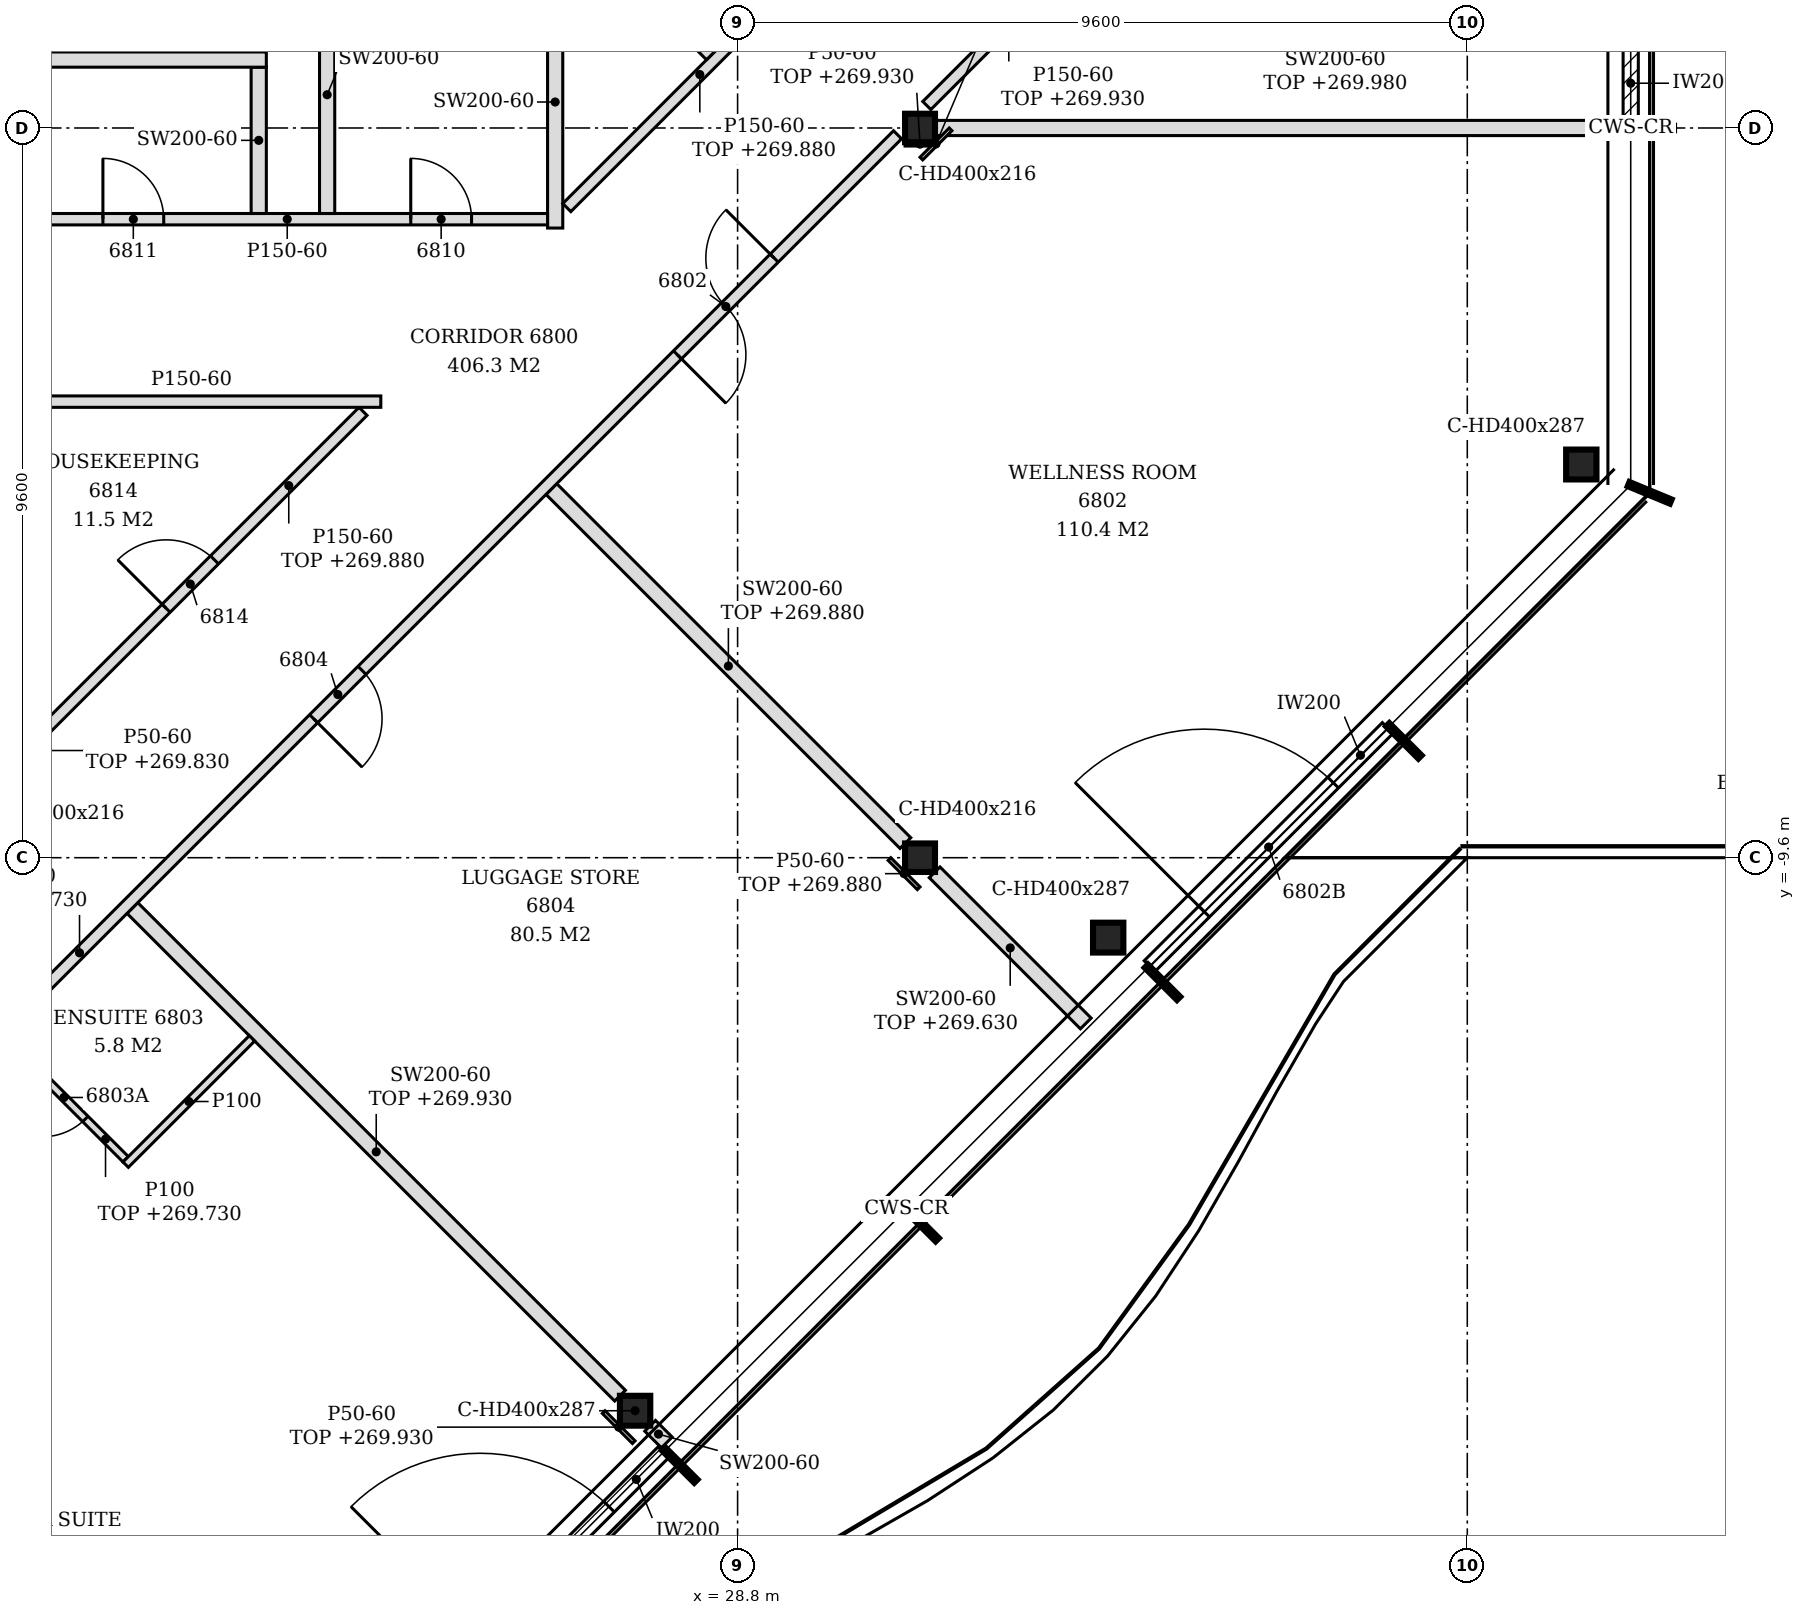
"""IFC4 building model, lengths in metres.
Left out: names, types, materials, properties, quantities, classifications, styles, units other than length and angle.
Written with IfcOpenShell. Run it as: python <this file> out.ifc"""

import sys

from ifc_helpers import new_model, si_unit, direction, frame, frame_2d, origin, origin_2d, place, context, subcontext, project, spatial, polyline, rectangle, i_section, outline, extrude, element, fill, save


model = new_model("IFC4")
c1 = context("Model", 3, precision=1e-05, world=origin(), true_north=direction((0.0, 1.0)))
c2 = subcontext(c1, "Body", "Model", "MODEL_VIEW")
j1 = project(units=[si_unit("LENGTHUNIT", "METRE"), si_unit("PLANEANGLEUNIT", "RADIAN")], contexts=[c1])
p1 = place(None, origin())
s1 = spatial("IfcSite", under=j1, at=p1, CompositionType="ELEMENT")
p2 = place(p1, origin())
s2 = spatial("IfcBuilding", under=s1, at=p2, CompositionType="ELEMENT")
p3 = place(p2, frame((0.0, 0.0, 267.0)))
s3 = spatial("IfcBuildingStorey", under=s2, at=p3, CompositionType="ELEMENT", Elevation=267.0)
for number, where, z_axis, x_axis in (
    (1, (27.451, -16.876, -0.15), (0.0, 0.0, 1.0), (1.0, 0.0, 0.0)),
    (2, (33.676, -10.652, -0.15), (0.0, 0.0, 1.0), (1.0, 0.0, 0.0)),
    (3, (39.9, -4.427, -0.15), (0.0, 0.0, 1.0), (1.0, 0.0, 0.0)),
):
    element("IfcColumn", number, at=place(p3, frame(where, z_axis=z_axis, x_axis=x_axis)), inside=s3, PredefinedType="COLUMN", context=c2, shape_type="SweptSolid", body=[
        extrude(i_section(OverallWidth=0.399, OverallDepth=0.393, WebThickness=0.023, FlangeThickness=0.037, FilletRadius=0.015, at=origin_2d()), origin(), (0.0, 0.0, 1.0), 3.6),
    ])
for number, where, z_axis, x_axis in (
    (4, (31.2, -9.6, -0.15), (0.0, 0.0, 1.0), (1.0, 0.0, 0.0)),
    (5, (31.2, 0.0, -0.15), (0.0, 0.0, 1.0), (1.0, 0.0, 0.0)),
):
    element("IfcColumn", number, at=place(p3, frame(where, z_axis=z_axis, x_axis=x_axis)), inside=s3, PredefinedType="COLUMN", context=c2, shape_type="SweptSolid", body=[
        extrude(i_section(OverallWidth=0.394, OverallDepth=0.375, WebThickness=0.017, FlangeThickness=0.028, FilletRadius=0.015, at=origin_2d()), origin(), (0.0, 0.0, 1.0), 3.6),
    ])
p4 = place(p3, frame((24.693, -20.553, 0.0), z_axis=(0.0, 0.0, 1.0), x_axis=(0.707079231393, 0.707134329907, 0.0)))
e6 = element("IfcWall", 6, at=p4, inside=s3, PredefinedType="NOTDEFINED", context=c2, shape_type="SweptSolid", body=[
    extrude(rectangle(XDim=4.431, YDim=0.2, at=frame_2d((2.215, 0.0))), origin(), (0.0, 0.0, 1.0), 3.45),
])
p5 = place(p4, frame((1.015, 0.0, 0.0)))
e7 = element("IfcOpeningElement", 7, at=p5, cuts=e6, PredefinedType="OPENING", context=c2, shape_type="SweptSolid", body=[
    extrude(rectangle(XDim=2.4, YDim=2.4, at=frame_2d((1.2, 1.2))), frame((0.0, 0.11, 0.0), z_axis=(0.0, -1.0, 0.0), x_axis=(1.0, 0.0, 0.0)), (0.0, 0.0, 1.0), 0.22),
])
p6 = place(p3, frame((34.22, -11.026, 0.0), z_axis=(0.0, 0.0, 1.0), x_axis=(0.707134329907, 0.707079231393, 0.0)))
e8 = element("IfcWall", 8, at=p6, inside=s3, PredefinedType="NOTDEFINED", context=c2, shape_type="SweptSolid", body=[
    extrude(rectangle(XDim=4.431, YDim=0.2, at=frame_2d((2.215, 0.0))), origin(), (0.0, 0.0, 1.0), 3.45),
])
p7 = place(p6, frame((1.015, 0.0, 0.0)))
e9 = element("IfcOpeningElement", 9, at=p7, cuts=e8, PredefinedType="OPENING", context=c2, shape_type="SweptSolid", body=[
    extrude(rectangle(XDim=2.4, YDim=2.4, at=frame_2d((1.2, 1.2))), frame((0.0, 0.11, 0.0), z_axis=(0.0, -1.0, 0.0), x_axis=(1.0, 0.0, 0.0)), (0.0, 0.0, 1.0), 0.22),
])
p8 = place(p3, frame((40.55, 0.03, 0.0), z_axis=(0.0, 0.0, 1.0), x_axis=(0.0, 1.0, 0.0)))
e10 = element("IfcWall", 10, at=p8, inside=s3, PredefinedType="NOTDEFINED", context=c2, shape_type="SweptSolid", body=[
    extrude(rectangle(XDim=4.626, YDim=0.2, at=frame_2d((2.313, 0.0))), origin(), (0.0, 0.0, 1.0), 3.45),
])
p9 = place(p8, frame((1.118, 0.0, 0.0)))
e11 = element("IfcOpeningElement", 11, at=p9, cuts=e10, PredefinedType="OPENING", context=c2, shape_type="SweptSolid", body=[
    extrude(rectangle(XDim=2.4, YDim=2.4, at=frame_2d((1.2, 1.2))), frame((0.0, 0.11, 0.0), z_axis=(0.0, -1.0, 0.0), x_axis=(1.0, 0.0, 0.0)), (0.0, 0.0, 1.0), 0.22),
])
p10 = place(p3, frame((27.869, -17.293, 0.0), z_axis=(0.0, 0.0, 1.0), x_axis=(-0.707106781187, 0.707106781187, 0.0)))
e12 = element("IfcWall", 12, at=p10, inside=s3, PredefinedType="PARTITIONING", context=c2, shape_type="SweptSolid", body=[
    extrude(rectangle(XDim=0.31, YDim=0.2, at=frame_2d((0.155, 0.0))), origin(), (0.0, 0.0, 1.0), 3.45),
])
p11 = place(p3, frame((14.322, -16.672, 0.0), z_axis=(0.0, 0.0, 1.0), x_axis=(0.707106781187, 0.707106781187, 0.0)))
e13 = element("IfcWall", 13, at=p11, inside=s3, PredefinedType="PARTITIONING", context=c2, shape_type="SweptSolid", body=[
    extrude(rectangle(XDim=23.452, YDim=0.15, at=frame_2d((11.726, 0.0))), origin(), (0.0, 0.0, 1.0), 2.73),
])
p12 = place(p11, frame((19.357, 0.0, 0.0)))
e14 = element("IfcOpeningElement", 14, at=p12, cuts=e13, PredefinedType="OPENING", context=c2, shape_type="SweptSolid", body=[
    extrude(rectangle(XDim=1.8, YDim=2.1, at=frame_2d((0.9, 1.05))), frame((0.0, 0.085, 0.0), z_axis=(0.0, -1.0, 0.0), x_axis=(1.0, 0.0, 0.0)), (0.0, 0.0, 1.0), 0.17),
])
p13 = place(p11, frame((2.975, 0.0, 0.0)))
e15 = element("IfcOpeningElement", 15, at=p13, cuts=e13, PredefinedType="OPENING", context=c2, shape_type="SweptSolid", body=[
    extrude(rectangle(XDim=0.9, YDim=2.1, at=frame_2d((0.45, 1.05))), frame((0.0, 0.085, 0.0), z_axis=(0.0, -1.0, 0.0), x_axis=(1.0, 0.0, 0.0)), (0.0, 0.0, 1.0), 0.17),
])
p14 = place(p11, frame((12.587, 0.0, 0.0)))
e16 = element("IfcOpeningElement", 16, at=p14, cuts=e13, PredefinedType="OPENING", context=c2, shape_type="SweptSolid", body=[
    extrude(rectangle(XDim=0.9, YDim=2.1, at=frame_2d((0.45, 1.05))), frame((0.0, 0.085, 0.0), z_axis=(0.0, -1.0, 0.0), x_axis=(1.0, 0.0, 0.0)), (0.0, 0.0, 1.0), 0.17),
])
p15 = place(p3, frame((27.254, -16.677, 0.0), z_axis=(0.0, 0.0, 1.0), x_axis=(-0.707120235152, 0.707093326965, 0.0)))
e17 = element("IfcWall", 17, at=p15, inside=s3, PredefinedType="PARTITIONING", context=c2, shape_type="SweptSolid", body=[
    extrude(rectangle(XDim=9.073, YDim=0.2, at=frame_2d((4.537, 0.0))), origin(), (0.0, 0.0, 1.0), 2.93),
])
p16 = place(p3, frame((20.75, -13.568, 0.0), z_axis=(0.0, 0.0, 1.0), x_axis=(-0.707053116953, 0.707160441348, 0.0)))
e18 = element("IfcWall", 18, at=p16, inside=s3, PredefinedType="PARTITIONING", context=c2, shape_type="SweptSolid", body=[
    extrude(rectangle(XDim=2.275, YDim=0.1, at=frame_2d((1.137, 0.0))), origin(), (0.0, 0.0, 1.0), 2.73),
])
p17 = place(p16, frame((0.75, 0.0, 0.0)))
e19 = element("IfcOpeningElement", 19, at=p17, cuts=e18, PredefinedType="OPENING", context=c2, shape_type="SweptSolid", body=[
    extrude(rectangle(XDim=0.8, YDim=2.1, at=frame_2d((0.4, 1.05))), frame((0.0, 0.06, 0.0), z_axis=(0.0, -1.0, 0.0), x_axis=(1.0, 0.0, 0.0)), (0.0, 0.0, 1.0), 0.12),
])
p18 = place(p3, frame((20.75, -13.638, 0.0), z_axis=(0.0, 0.0, 1.0), x_axis=(0.707158722772, 0.707054835785, 0.0)))
e20 = element("IfcWall", 20, at=p18, inside=s3, PredefinedType="PARTITIONING", context=c2, shape_type="SweptSolid", body=[
    extrude(rectangle(XDim=2.35, YDim=0.1, at=frame_2d((1.175, 0.0))), origin(), (0.0, 0.0, 1.0), 3.45),
])
p19 = place(p3, frame((33.381, -11.781, 0.0), z_axis=(0.0, 0.0, 1.0), x_axis=(-0.707106781187, 0.707106781187, 0.0)))
e21 = element("IfcWall", 21, at=p19, inside=s3, PredefinedType="PARTITIONING", context=c2, shape_type="SweptSolid", body=[
    extrude(rectangle(XDim=2.812, YDim=0.2, at=frame_2d((1.406, 0.0))), origin(), (0.0, 0.0, 1.0), 2.63),
])
p20 = place(p3, frame((31.008, -9.408, 0.0), z_axis=(0.0, 0.0, 1.0), x_axis=(-0.707106781187, 0.707106781187, 0.0)))
e22 = element("IfcWall", 22, at=p20, inside=s3, PredefinedType="PARTITIONING", context=c2, shape_type="SweptSolid", body=[
    extrude(rectangle(XDim=6.587, YDim=0.2, at=frame_2d((3.293, 0.0))), origin(), (0.0, 0.0, 1.0), 2.88),
])
p21 = place(p3, frame((19.392, -8.208, 0.0), z_axis=(0.0, 0.0, 1.0), x_axis=(0.707106781187, 0.707106781187, 0.0)))
e23 = element("IfcWall", 23, at=p21, inside=s3, PredefinedType="PARTITIONING", context=c2, shape_type="SweptSolid", body=[
    extrude(rectangle(XDim=6.335, YDim=0.15, at=frame_2d((3.167, 0.0))), origin(), (0.0, 0.0, 1.0), 2.88),
])
p22 = place(p21, frame((2.672, 0.0, 0.0)))
e24 = element("IfcOpeningElement", 24, at=p22, cuts=e23, PredefinedType="OPENING", context=c2, shape_type="SweptSolid", body=[
    extrude(rectangle(XDim=0.9, YDim=2.1, at=frame_2d((0.45, 1.05))), frame((0.0, 0.085, 0.0), z_axis=(0.0, -1.0, 0.0), x_axis=(1.0, 0.0, 0.0)), (0.0, 0.0, 1.0), 0.17),
])
p23 = place(p3, frame((19.125, -3.6, 0.0), z_axis=(0.0, 0.0, 1.0), x_axis=(1.0, 0.0, 0.0)))
e25 = element("IfcWall", 25, at=p23, inside=s3, PredefinedType="PARTITIONING", context=c2, shape_type="SweptSolid", body=[
    extrude(outline(polyline([(0.0, 0.0), (4.981, 0.0), (4.981, 3.45), (0.225, 3.45), (0.223, 2.83), (0.0, 2.83), (0.0, 0.0)])), frame((0.0, 0.075, 0.0), z_axis=(0.0, -1.0, 0.0), x_axis=(1.0, 0.0, 0.0)), (0.0, 0.0, 1.0), 0.15),
])
p24 = place(p3, frame((26.4, -1.316, 0.0), z_axis=(0.0, 0.0, 1.0), x_axis=(0.0, 1.0, 0.0)))
e26 = element("IfcWall", 26, at=p24, inside=s3, PredefinedType="PARTITIONING", context=c2, shape_type="SweptSolid", body=[
    extrude(outline(polyline([(0.0, 0.0), (3.316, 0.0), (3.316, 3.45), (1.421, 3.45), (1.419, 2.88), (1.211, 2.88), (1.209, 3.45), (0.0, 3.45), (0.0, 0.0)])), frame((0.0, 0.1, 0.0), z_axis=(0.0, -1.0, 0.0), x_axis=(1.0, 0.0, 0.0)), (0.0, 0.0, 1.0), 0.2),
])
p25 = place(p3, frame((19.125, -1.2, 0.0), z_axis=(0.0, 0.0, 1.0), x_axis=(1.0, 0.0, 0.0)))
e27 = element("IfcWall", 27, at=p25, inside=s3, PredefinedType="PARTITIONING", context=c2, shape_type="SweptSolid", body=[
    extrude(outline(polyline([(0.0, 0.0), (7.175, 0.0), (7.175, 3.45), (0.225, 3.45), (0.223, 2.83), (0.0, 2.83), (0.0, 0.0)])), frame((0.0, 0.075, 0.0), z_axis=(0.0, -1.0, 0.0), x_axis=(1.0, 0.0, 0.0)), (0.0, 0.0, 1.0), 0.15),
])
p26 = place(p25, frame((5.375, 0.0, 0.0)))
e28 = element("IfcOpeningElement", 28, at=p26, cuts=e27, PredefinedType="OPENING", context=c2, shape_type="SweptSolid", body=[
    extrude(rectangle(XDim=0.8, YDim=2.1, at=frame_2d((0.4, 1.05))), frame((0.0, 0.085, 0.0), z_axis=(0.0, -1.0, 0.0), x_axis=(1.0, 0.0, 0.0)), (0.0, 0.0, 1.0), 0.17),
])
p27 = place(p25, frame((1.325, 0.0, 0.0)))
e29 = element("IfcOpeningElement", 29, at=p27, cuts=e27, PredefinedType="OPENING", context=c2, shape_type="SweptSolid", body=[
    extrude(rectangle(XDim=0.8, YDim=2.1, at=frame_2d((0.4, 1.05))), frame((0.0, 0.085, 0.0), z_axis=(0.0, -1.0, 0.0), x_axis=(1.0, 0.0, 0.0)), (0.0, 0.0, 1.0), 0.17),
])
p28 = place(p3, frame((22.5, -1.125, 0.0), z_axis=(0.0, 0.0, 1.0), x_axis=(0.0, 1.0, 0.0)))
e30 = element("IfcWall", 30, at=p28, inside=s3, PredefinedType="PARTITIONING", context=c2, shape_type="SweptSolid", body=[
    extrude(outline(polyline([(0.0, 0.0), (1.925, 0.0), (1.925, 3.45), (1.23, 3.45), (1.228, 2.88), (1.02, 2.88), (1.018, 3.45), (0.0, 3.45), (0.0, 0.0)])), frame((0.0, 0.1, 0.0), z_axis=(0.0, -1.0, 0.0), x_axis=(1.0, 0.0, 0.0)), (0.0, 0.0, 1.0), 0.2),
])
p29 = place(p3, frame((23.4, -1.125, 0.0), z_axis=(0.0, 0.0, 1.0), x_axis=(0.0, 1.0, 0.0)))
e31 = element("IfcWall", 31, at=p29, inside=s3, PredefinedType="PARTITIONING", context=c2, shape_type="SweptSolid", body=[
    extrude(outline(polyline([(0.0, 0.0), (3.125, 0.0), (3.125, 3.45), (1.23, 3.45), (1.228, 2.88), (1.02, 2.88), (1.018, 3.45), (0.0, 3.45), (0.0, 0.0)])), frame((0.0, 0.1, 0.0), z_axis=(0.0, -1.0, 0.0), x_axis=(1.0, 0.0, 0.0)), (0.0, 0.0, 1.0), 0.2),
])
p30 = place(p3, frame((26.553, -1.047, 0.0), z_axis=(0.0, 0.0, 1.0), x_axis=(0.707106781187, 0.707106781187, 0.0)))
e32 = element("IfcWall", 32, at=p30, inside=s3, PredefinedType="PARTITIONING", context=c2, shape_type="SweptSolid", body=[
    extrude(rectangle(XDim=4.95, YDim=0.15, at=frame_2d((2.475, 0.0))), origin(), (0.0, 0.0, 1.0), 2.88),
])
p31 = place(p3, frame((31.397, 0.0, 0.0), z_axis=(0.0, 0.0, 1.0), x_axis=(1.0, 0.0, 0.0)))
e33 = element("IfcWall", 33, at=p31, inside=s3, PredefinedType="PARTITIONING", context=c2, shape_type="SweptSolid", body=[
    extrude(outline(polyline([(0.0, 0.0), (9.053, 0.0), (9.053, 2.98), (8.653, 2.98), (8.651, 2.93), (8.353, 2.93), (8.351, 2.98), (0.0, 2.98), (0.0, 0.0)])), frame((0.0, 0.1, 0.0), z_axis=(0.0, -1.0, 0.0), x_axis=(1.0, 0.0, 0.0)), (0.0, 0.0, 1.0), 0.2),
])
p32 = place(p3, frame((31.289, 0.295, 0.0), z_axis=(0.0, 0.0, 1.0), x_axis=(0.707146786096, 0.707066774014, 0.0)))
e34 = element("IfcWall", 34, at=p32, inside=s3, PredefinedType="PARTITIONING", context=c2, shape_type="SweptSolid", body=[
    extrude(rectangle(XDim=3.051, YDim=0.15, at=frame_2d((1.526, 0.0))), origin(), (0.0, 0.0, 1.0), 2.93),
])
p33 = place(p3, frame((19.275, 0.9, 0.0), z_axis=(0.0, 0.0, 1.0), x_axis=(1.0, 0.0, 0.0)))
e35 = element("IfcWall", 35, at=p33, inside=s3, PredefinedType="PARTITIONING", context=c2, shape_type="SweptSolid", body=[
    extrude(outline(polyline([(0.0, 0.0), (3.325, 0.0), (3.325, 3.45), (0.075, 3.45), (0.073, 2.83), (0.0, 2.83), (0.0, 0.0)])), frame((0.0, 0.1, 0.0), z_axis=(0.0, -1.0, 0.0), x_axis=(1.0, 0.0, 0.0)), (0.0, 0.0, 1.0), 0.2),
])
p34 = place(p3, frame((28.462, 0.968, 0.0), z_axis=(0.0, 0.0, 1.0), x_axis=(-0.707106781187, 0.707106781187, 0.0)))
e36 = element("IfcWall", 36, at=p34, inside=s3, PredefinedType="PARTITIONING", context=c2, shape_type="SweptSolid", body=[
    extrude(rectangle(XDim=3.124, YDim=0.2, at=frame_2d((1.562, 0.0))), origin(), (0.0, 0.0, 1.0), 3.45),
])
p35 = place(p3, frame((27.434, -17.289, 0.0), z_axis=(0.0, 0.0, 1.0), x_axis=(-0.707106781187, 0.707106781187, 0.0)))
e37 = element("IfcWall", 37, at=p35, inside=s3, PredefinedType="PARTITIONING", context=c2, shape_type="SweptSolid", body=[
    extrude(rectangle(XDim=0.56, YDim=0.05, at=frame_2d((0.28, 0.0))), origin(), (0.0, 0.0, 1.0), 2.93),
])
p36 = place(p3, frame((31.218, -0.402, 0.0), z_axis=(0.0, 0.0, 1.0), x_axis=(0.707106781187, 0.707106781187, 0.0)))
e38 = element("IfcWall", 38, at=p36, inside=s3, PredefinedType="PARTITIONING", context=c2, shape_type="SweptSolid", body=[
    extrude(rectangle(XDim=0.544, YDim=0.05, at=frame_2d((0.272, 0.0))), origin(), (0.0, 0.0, 1.0), 2.93),
])
p37 = place(p3, frame((31.182, -10.002, 0.0), z_axis=(0.0, 0.0, 1.0), x_axis=(-0.707106781187, 0.707106781187, 0.0)))
e39 = element("IfcWall", 39, at=p37, inside=s3, PredefinedType="PARTITIONING", context=c2, shape_type="SweptSolid", body=[
    extrude(rectangle(XDim=0.544, YDim=0.05, at=frame_2d((0.272, 0.0))), origin(), (0.0, 0.0, 1.0), 2.88),
])
p38 = place(p3, frame((31.003, -0.212, 0.0), z_axis=(0.0, 0.0, 1.0), x_axis=(1.0, 0.0, 0.0)))
e40 = element("IfcWall", 40, at=p38, inside=s3, PredefinedType="PARTITIONING", context=c2, shape_type="SweptSolid", body=[
    extrude(rectangle(XDim=0.394, YDim=0.05, at=frame_2d((0.197, 0.0))), origin(), (0.0, 0.0, 1.0), 2.93),
])
p39 = place(p5, origin())
e41 = element("IfcDoor", 41, at=p39, inside=s3, OperationType="SINGLE_SWING_LEFT", PredefinedType="DOOR", context=c2, shape_type="SweptSolid", body=[
    extrude(rectangle(XDim=2.4, YDim=2.4, at=frame_2d((1.2, 1.2))), frame((0.0, 0.025, 0.0), z_axis=(0.0, -1.0, 0.0), x_axis=(1.0, 0.0, 0.0)), (0.0, 0.0, 1.0), 0.05),
])
fill(e7, e41)
p40 = place(p7, origin())
e42 = element("IfcDoor", 42, at=p40, inside=s3, OperationType="SINGLE_SWING_LEFT", PredefinedType="DOOR", context=c2, shape_type="SweptSolid", body=[
    extrude(rectangle(XDim=2.4, YDim=2.4, at=frame_2d((1.2, 1.2))), frame((0.0, 0.025, 0.0), z_axis=(0.0, -1.0, 0.0), x_axis=(1.0, 0.0, 0.0)), (0.0, 0.0, 1.0), 0.05),
])
fill(e9, e42)
p41 = place(p12, frame((1.8, 0.0, 0.0), z_axis=(0.0, 0.0, 1.0), x_axis=(-1.0, 0.0, 0.0)))
e43 = element("IfcDoor", 43, at=p41, inside=s3, OperationType="DOUBLE_DOOR_SINGLE_SWING", PredefinedType="DOOR", context=c2, shape_type="SweptSolid", body=[
    extrude(rectangle(XDim=1.8, YDim=2.1, at=frame_2d((0.9, 1.05))), frame((0.0, 0.025, 0.0), z_axis=(0.0, -1.0, 0.0), x_axis=(1.0, 0.0, 0.0)), (0.0, 0.0, 1.0), 0.05),
])
fill(e14, e43)
p42 = place(p17, origin())
e44 = element("IfcDoor", 44, at=p42, inside=s3, OperationType="SINGLE_SWING_RIGHT", PredefinedType="DOOR", context=c2, shape_type="SweptSolid", body=[
    extrude(rectangle(XDim=0.8, YDim=2.1, at=frame_2d((0.4, 1.05))), frame((0.0, 0.025, 0.0), z_axis=(0.0, -1.0, 0.0), x_axis=(1.0, 0.0, 0.0)), (0.0, 0.0, 1.0), 0.05),
])
fill(e19, e44)
p43 = place(p14, frame((0.9, 0.0, 0.0), z_axis=(0.0, 0.0, 1.0), x_axis=(-1.0, 0.0, 0.0)))
e45 = element("IfcDoor", 45, at=p43, inside=s3, OperationType="SINGLE_SWING_RIGHT", PredefinedType="DOOR", context=c2, shape_type="SweptSolid", body=[
    extrude(rectangle(XDim=0.9, YDim=2.1, at=frame_2d((0.45, 1.05))), frame((0.0, 0.025, 0.0), z_axis=(0.0, -1.0, 0.0), x_axis=(1.0, 0.0, 0.0)), (0.0, 0.0, 1.0), 0.05),
])
fill(e16, e45)
p44 = place(p26, origin())
e46 = element("IfcDoor", 46, at=p44, inside=s3, OperationType="SINGLE_SWING_LEFT", PredefinedType="DOOR", context=c2, shape_type="SweptSolid", body=[
    extrude(rectangle(XDim=0.8, YDim=2.1, at=frame_2d((0.4, 1.05))), frame((0.0, 0.025, 0.0), z_axis=(0.0, -1.0, 0.0), x_axis=(1.0, 0.0, 0.0)), (0.0, 0.0, 1.0), 0.05),
])
fill(e28, e46)
p45 = place(p27, origin())
e47 = element("IfcDoor", 47, at=p45, inside=s3, OperationType="SINGLE_SWING_LEFT", PredefinedType="DOOR", context=c2, shape_type="SweptSolid", body=[
    extrude(rectangle(XDim=0.8, YDim=2.1, at=frame_2d((0.4, 1.05))), frame((0.0, 0.025, 0.0), z_axis=(0.0, -1.0, 0.0), x_axis=(1.0, 0.0, 0.0)), (0.0, 0.0, 1.0), 0.05),
])
fill(e29, e47)
p46 = place(p22, origin())
e48 = element("IfcDoor", 48, at=p46, inside=s3, OperationType="SINGLE_SWING_LEFT", PredefinedType="DOOR", context=c2, shape_type="SweptSolid", body=[
    extrude(rectangle(XDim=0.9, YDim=2.1, at=frame_2d((0.45, 1.05))), frame((0.0, 0.025, 0.0), z_axis=(0.0, -1.0, 0.0), x_axis=(1.0, 0.0, 0.0)), (0.0, 0.0, 1.0), 0.05),
])
fill(e24, e48)
save(model, sys.argv[1])
